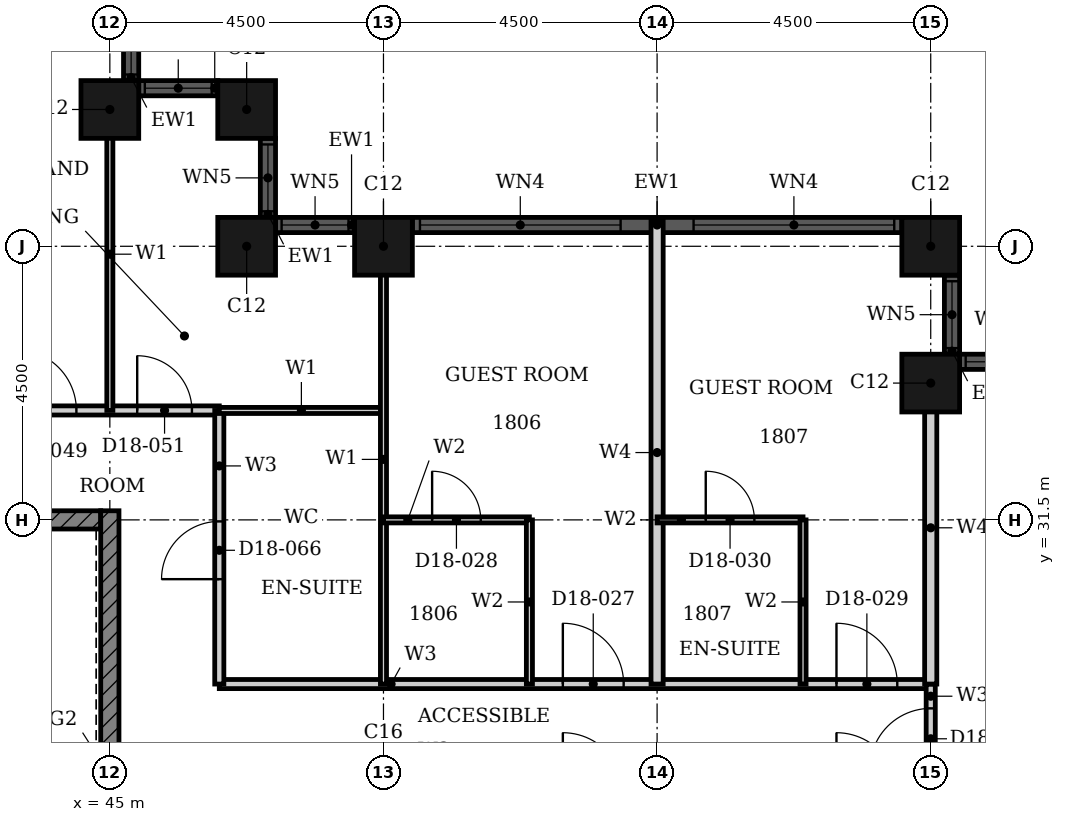
"""IFC4 building model, lengths in metres.
Left out: names, types, materials, properties, quantities, classifications, styles, units other than length and angle.
Written with IfcOpenShell. Run it as: python <this file> out.ifc"""

import sys

from ifc_helpers import new_model, si_unit, direction, frame, frame_2d, origin, origin_2d, place, context, subcontext, project, spatial, rectangle, hollow_rectangle, extrude, element, fill, save


model = new_model("IFC4")
c1 = context("Model", 3, precision=1e-05, world=origin(), true_north=direction((0.0, 1.0)))
c2 = subcontext(c1, "Body", "Model", "MODEL_VIEW")
j1 = project(units=[si_unit("LENGTHUNIT", "METRE"), si_unit("PLANEANGLEUNIT", "RADIAN")], contexts=[c1])
p1 = place(None, origin())
s1 = spatial("IfcSite", under=j1, at=p1, CompositionType="ELEMENT")
p2 = place(p1, origin())
s2 = spatial("IfcBuilding", under=s1, at=p2, CompositionType="ELEMENT")
p3 = place(p2, frame((0.0, 0.0, 78.0)))
s3 = spatial("IfcBuildingStorey", under=s2, at=p3, CompositionType="ELEMENT", Elevation=78.0)
for number, where, z_axis, x_axis in (
    (1, (58.5, 33.75, 0.0), (0.0, 0.0, 1.0), (1.0, 0.0, 0.0)),
    (2, (58.5, 36.0, 0.0), (0.0, 0.0, 1.0), (1.0, 0.0, 0.0)),
    (3, (49.5, 36.0, 0.0), (0.0, 0.0, 1.0), (1.0, 0.0, 0.0)),
    (4, (47.25, 36.0, 0.0), (0.0, 0.0, 1.0), (1.0, 0.0, 0.0)),
    (5, (47.25, 38.25, 0.0), (0.0, 0.0, 1.0), (1.0, 0.0, 0.0)),
    (6, (45.0, 38.25, 0.0), (0.0, 0.0, 1.0), (1.0, 0.0, 0.0)),
):
    element("IfcColumn", number, at=place(p3, frame(where, z_axis=z_axis, x_axis=x_axis)), inside=s3, PredefinedType="COLUMN", context=c2, shape_type="SweptSolid", body=[
        extrude(hollow_rectangle(XDim=0.95, YDim=0.95, WallThickness=0.03, at=origin_2d()), origin(), (0.0, 0.0, 1.0), 3.6),
    ])
p4 = place(p3, frame((60.275, 34.1, 0.0), z_axis=(0.0, 0.0, 1.0), x_axis=(-1.0, 0.0, 0.0)))
e7 = element("IfcWall", 7, at=p4, inside=s3, PredefinedType="SOLIDWALL", context=c2, shape_type="SweptSolid", body=[
    extrude(rectangle(XDim=1.3, YDim=0.25, at=frame_2d((0.65, 0.0))), origin(), (0.0, 0.0, 1.0), 3.6),
])
p5 = place(p4, frame((0.1, 0.0, 0.9)))
e8 = element("IfcOpeningElement", 8, at=p5, cuts=e7, PredefinedType="OPENING", context=c2, shape_type="SweptSolid", body=[
    extrude(rectangle(XDim=1.1, YDim=2.08, at=frame_2d((0.55, 1.04))), frame((0.0, 0.135, 0.0), z_axis=(0.0, -1.0, 0.0), x_axis=(1.0, 0.0, 0.0)), (0.0, 0.0, 1.0), 0.27),
])
p6 = place(p3, frame((58.85, 34.225, 0.0), z_axis=(0.0, 0.0, 1.0), x_axis=(0.0, 1.0, 0.0)))
e9 = element("IfcWall", 9, at=p6, inside=s3, PredefinedType="SOLIDWALL", context=c2, shape_type="SweptSolid", body=[
    extrude(rectangle(XDim=1.3, YDim=0.25, at=frame_2d((0.65, 0.0))), origin(), (0.0, 0.0, 1.0), 3.6),
])
p7 = place(p6, frame((0.1, 0.0, 0.9)))
e10 = element("IfcOpeningElement", 10, at=p7, cuts=e9, PredefinedType="OPENING", context=c2, shape_type="SweptSolid", body=[
    extrude(rectangle(XDim=1.1, YDim=2.08, at=frame_2d((0.55, 1.04))), frame((0.0, 0.135, 0.0), z_axis=(0.0, -1.0, 0.0), x_axis=(1.0, 0.0, 0.0)), (0.0, 0.0, 1.0), 0.27),
])
p8 = place(p3, frame((58.025, 36.35, 0.0), z_axis=(0.0, 0.0, 1.0), x_axis=(-1.0, 0.0, 0.0)))
e11 = element("IfcWall", 11, at=p8, inside=s3, PredefinedType="SOLIDWALL", context=c2, shape_type="SweptSolid", body=[
    extrude(rectangle(XDim=8.05, YDim=0.25, at=frame_2d((4.025, 0.0))), origin(), (0.0, 0.0, 1.0), 3.6),
])
p9 = place(p8, frame((0.125, 0.0, 0.9)))
e12 = element("IfcOpeningElement", 12, at=p9, cuts=e11, PredefinedType="OPENING", context=c2, shape_type="SweptSolid", body=[
    extrude(rectangle(XDim=3.3, YDim=2.08, at=frame_2d((1.65, 1.04))), frame((0.0, 0.135, 0.0), z_axis=(0.0, -1.0, 0.0), x_axis=(1.0, 0.0, 0.0)), (0.0, 0.0, 1.0), 0.27),
])
p10 = place(p8, frame((4.625, 0.0, 0.9)))
e13 = element("IfcOpeningElement", 13, at=p10, cuts=e11, PredefinedType="OPENING", context=c2, shape_type="SweptSolid", body=[
    extrude(rectangle(XDim=3.3, YDim=2.08, at=frame_2d((1.65, 1.04))), frame((0.0, 0.135, 0.0), z_axis=(0.0, -1.0, 0.0), x_axis=(1.0, 0.0, 0.0)), (0.0, 0.0, 1.0), 0.27),
])
p11 = place(p3, frame((49.025, 36.35, 0.0), z_axis=(0.0, 0.0, 1.0), x_axis=(-1.0, 0.0, 0.0)))
e14 = element("IfcWall", 14, at=p11, inside=s3, PredefinedType="SOLIDWALL", context=c2, shape_type="SweptSolid", body=[
    extrude(rectangle(XDim=1.3, YDim=0.25, at=frame_2d((0.65, 0.0))), origin(), (0.0, 0.0, 1.0), 3.6),
])
p12 = place(p11, frame((0.1, 0.0, 0.9)))
e15 = element("IfcOpeningElement", 15, at=p12, cuts=e14, PredefinedType="OPENING", context=c2, shape_type="SweptSolid", body=[
    extrude(rectangle(XDim=1.1, YDim=2.08, at=frame_2d((0.55, 1.04))), frame((0.0, 0.135, 0.0), z_axis=(0.0, -1.0, 0.0), x_axis=(1.0, 0.0, 0.0)), (0.0, 0.0, 1.0), 0.27),
])
p13 = place(p3, frame((47.6, 36.475, 0.0), z_axis=(0.0, 0.0, 1.0), x_axis=(0.0, 1.0, 0.0)))
e16 = element("IfcWall", 16, at=p13, inside=s3, PredefinedType="SOLIDWALL", context=c2, shape_type="SweptSolid", body=[
    extrude(rectangle(XDim=1.3, YDim=0.25, at=frame_2d((0.65, 0.0))), origin(), (0.0, 0.0, 1.0), 3.6),
])
p14 = place(p13, frame((0.1, 0.0, 0.9)))
e17 = element("IfcOpeningElement", 17, at=p14, cuts=e16, PredefinedType="OPENING", context=c2, shape_type="SweptSolid", body=[
    extrude(rectangle(XDim=1.1, YDim=2.08, at=frame_2d((0.55, 1.04))), frame((0.0, 0.135, 0.0), z_axis=(0.0, -1.0, 0.0), x_axis=(1.0, 0.0, 0.0)), (0.0, 0.0, 1.0), 0.27),
])
p15 = place(p3, frame((46.775, 38.6, 0.0), z_axis=(0.0, 0.0, 1.0), x_axis=(-1.0, 0.0, 0.0)))
e18 = element("IfcWall", 18, at=p15, inside=s3, PredefinedType="SOLIDWALL", context=c2, shape_type="SweptSolid", body=[
    extrude(rectangle(XDim=1.3, YDim=0.25, at=frame_2d((0.65, 0.0))), origin(), (0.0, 0.0, 1.0), 3.6),
])
p16 = place(p15, frame((0.1, 0.0, 0.9)))
e19 = element("IfcOpeningElement", 19, at=p16, cuts=e18, PredefinedType="OPENING", context=c2, shape_type="SweptSolid", body=[
    extrude(rectangle(XDim=1.1, YDim=2.08, at=frame_2d((0.55, 1.04))), frame((0.0, 0.135, 0.0), z_axis=(0.0, -1.0, 0.0), x_axis=(1.0, 0.0, 0.0)), (0.0, 0.0, 1.0), 0.27),
])
p17 = place(p3, frame((45.35, 38.725, 0.0), z_axis=(0.0, 0.0, 1.0), x_axis=(0.0, 1.0, 0.0)))
e20 = element("IfcWall", 20, at=p17, inside=s3, PredefinedType="SOLIDWALL", context=c2, shape_type="SweptSolid", body=[
    extrude(rectangle(XDim=1.3, YDim=0.25, at=frame_2d((0.65, 0.0))), origin(), (0.0, 0.0, 1.0), 3.6),
])
p18 = place(p17, frame((0.1, 0.0, 0.9)))
e21 = element("IfcOpeningElement", 21, at=p18, cuts=e20, PredefinedType="OPENING", context=c2, shape_type="SweptSolid", body=[
    extrude(rectangle(XDim=1.1, YDim=2.08, at=frame_2d((0.55, 1.04))), frame((0.0, 0.135, 0.0), z_axis=(0.0, -1.0, 0.0), x_axis=(1.0, 0.0, 0.0)), (0.0, 0.0, 1.0), 0.27),
])
p19 = place(p3, frame((40.625, 31.5, 0.0), z_axis=(0.0, 0.0, 1.0), x_axis=(1.0, 0.0, 0.0)))
e22 = element("IfcWall", 22, at=p19, inside=s3, PredefinedType="SHEAR", context=c2, shape_type="SweptSolid", body=[
    extrude(rectangle(XDim=4.225, YDim=0.3, at=frame_2d((2.113, 0.0))), origin(), (0.0, 0.0, 1.0), 3.3),
])
p20 = place(p3, frame((45.0, 22.35, 0.0), z_axis=(0.0, 0.0, 1.0), x_axis=(0.0, 1.0, 0.0)))
e23 = element("IfcWall", 23, at=p20, inside=s3, PredefinedType="SHEAR", context=c2, shape_type="SweptSolid", body=[
    extrude(rectangle(XDim=9.3, YDim=0.3, at=frame_2d((4.65, 0.0))), origin(), (0.0, 0.0, 1.0), 3.3),
])
p21 = place(p3, frame((46.8, 28.8, 0.0), z_axis=(0.0, 0.0, 1.0), x_axis=(1.0, 0.0, 0.0)))
e24 = element("IfcWall", 24, at=p21, inside=s3, PredefinedType="PARTITIONING", context=c2, shape_type="SweptSolid", body=[
    extrude(rectangle(XDim=11.7, YDim=0.15, at=frame_2d((5.85, 0.0))), origin(), (0.0, 0.0, 1.0), 3.3),
])
p22 = place(p21, frame((5.65, 0.0, 0.0)))
e25 = element("IfcOpeningElement", 25, at=p22, cuts=e24, PredefinedType="OPENING", context=c2, shape_type="SweptSolid", body=[
    extrude(rectangle(XDim=1.0, YDim=2.1, at=frame_2d((0.5, 1.05))), frame((0.0, 0.085, 0.0), z_axis=(0.0, -1.0, 0.0), x_axis=(1.0, 0.0, 0.0)), (0.0, 0.0, 1.0), 0.17),
])
p23 = place(p21, frame((10.15, 0.0, 0.0)))
e26 = element("IfcOpeningElement", 26, at=p23, cuts=e24, PredefinedType="OPENING", context=c2, shape_type="SweptSolid", body=[
    extrude(rectangle(XDim=1.0, YDim=2.1, at=frame_2d((0.5, 1.05))), frame((0.0, 0.085, 0.0), z_axis=(0.0, -1.0, 0.0), x_axis=(1.0, 0.0, 0.0)), (0.0, 0.0, 1.0), 0.17),
])
p24 = place(p3, frame((33.3, 33.3, 0.0), z_axis=(0.0, 0.0, 1.0), x_axis=(1.0, 0.0, 0.0)))
e27 = element("IfcWall", 27, at=p24, inside=s3, PredefinedType="PARTITIONING", context=c2, shape_type="SweptSolid", body=[
    extrude(rectangle(XDim=13.5, YDim=0.15, at=frame_2d((6.75, 0.0))), origin(), (0.0, 0.0, 1.0), 3.3),
])
p25 = place(p24, frame((10.15, 0.0, 0.0)))
e28 = element("IfcOpeningElement", 28, at=p25, cuts=e27, PredefinedType="OPENING", context=c2, shape_type="SweptSolid", body=[
    extrude(rectangle(XDim=1.0, YDim=2.1, at=frame_2d((0.5, 1.05))), frame((0.0, 0.085, 0.0), z_axis=(0.0, -1.0, 0.0), x_axis=(1.0, 0.0, 0.0)), (0.0, 0.0, 1.0), 0.17),
])
p26 = place(p24, frame((12.15, 0.0, 0.0)))
e29 = element("IfcOpeningElement", 29, at=p26, cuts=e27, PredefinedType="OPENING", context=c2, shape_type="SweptSolid", body=[
    extrude(rectangle(XDim=0.9, YDim=2.1, at=frame_2d((0.45, 1.05))), frame((0.0, 0.085, 0.0), z_axis=(0.0, -1.0, 0.0), x_axis=(1.0, 0.0, 0.0)), (0.0, 0.0, 1.0), 0.17),
])
p27 = place(p24, frame((3.15, 0.0, 0.0)))
e30 = element("IfcOpeningElement", 30, at=p27, cuts=e27, PredefinedType="OPENING", context=c2, shape_type="SweptSolid", body=[
    extrude(rectangle(XDim=0.9, YDim=2.1, at=frame_2d((0.45, 1.05))), frame((0.0, 0.085, 0.0), z_axis=(0.0, -1.0, 0.0), x_axis=(1.0, 0.0, 0.0)), (0.0, 0.0, 1.0), 0.17),
])
p28 = place(p3, frame((46.8, 28.8, 0.0), z_axis=(0.0, 0.0, 1.0), x_axis=(0.0, 1.0, 0.0)))
e31 = element("IfcWall", 31, at=p28, inside=s3, PredefinedType="PARTITIONING", context=c2, shape_type="SweptSolid", body=[
    extrude(rectangle(XDim=4.5, YDim=0.15, at=frame_2d((2.25, 0.0))), origin(), (0.0, 0.0, 1.0), 3.3),
])
p29 = place(p28, frame((1.725, 0.0, 0.0)))
e32 = element("IfcOpeningElement", 32, at=p29, cuts=e31, PredefinedType="OPENING", context=c2, shape_type="SweptSolid", body=[
    extrude(rectangle(XDim=0.95, YDim=2.1, at=frame_2d((0.475, 1.05))), frame((0.0, 0.085, 0.0), z_axis=(0.0, -1.0, 0.0), x_axis=(1.0, 0.0, 0.0)), (0.0, 0.0, 1.0), 0.17),
])
p30 = place(p3, frame((58.5, 27.0, 0.0), z_axis=(0.0, 0.0, 1.0), x_axis=(0.0, 1.0, 0.0)))
e33 = element("IfcWall", 33, at=p30, inside=s3, PredefinedType="PARTITIONING", context=c2, shape_type="SweptSolid", body=[
    extrude(rectangle(XDim=1.8, YDim=0.15, at=frame_2d((0.9, 0.0))), origin(), (0.0, 0.0, 1.0), 3.3),
])
p31 = place(p30, frame((0.4, 0.0, 0.0)))
e34 = element("IfcOpeningElement", 34, at=p31, cuts=e33, PredefinedType="OPENING", context=c2, shape_type="SweptSolid", body=[
    extrude(rectangle(XDim=1.0, YDim=2.1, at=frame_2d((0.5, 1.05))), frame((0.0, 0.085, 0.0), z_axis=(0.0, -1.0, 0.0), x_axis=(1.0, 0.0, 0.0)), (0.0, 0.0, 1.0), 0.17),
])
p32 = place(p3, frame((46.8, 33.3, 0.0), z_axis=(0.0, 0.0, 1.0), x_axis=(1.0, 0.0, 0.0)))
e35 = element("IfcWall", 35, at=p32, inside=s3, PredefinedType="PARTITIONING", context=c2, shape_type="SweptSolid", body=[
    extrude(rectangle(XDim=2.7, YDim=0.1, at=frame_2d((1.35, 0.0))), origin(), (0.0, 0.0, 1.0), 3.3),
])
p33 = place(p3, frame((45.0, 33.3, 0.0), z_axis=(0.0, 0.0, 1.0), x_axis=(0.0, 1.0, 0.0)))
e36 = element("IfcWall", 36, at=p33, inside=s3, PredefinedType="PARTITIONING", context=c2, shape_type="SweptSolid", body=[
    extrude(rectangle(XDim=5.14, YDim=0.1, at=frame_2d((2.57, 0.0))), origin(), (0.0, 0.0, 1.0), 3.3),
])
p34 = place(p3, frame((49.5, 28.8, 0.0), z_axis=(0.0, 0.0, 1.0), x_axis=(0.0, 1.0, 0.0)))
e37 = element("IfcWall", 37, at=p34, inside=s3, PredefinedType="PARTITIONING", context=c2, shape_type="SweptSolid", body=[
    extrude(rectangle(XDim=7.39, YDim=0.1, at=frame_2d((3.695, 0.0))), origin(), (0.0, 0.0, 1.0), 2.38),
])
p35 = place(p3, frame((54.0, 28.8, 0.0), z_axis=(0.0, 0.0, 1.0), x_axis=(0.0, 1.0, 0.0)))
e38 = element("IfcWall", 38, at=p35, inside=s3, PredefinedType="PARTITIONING", context=c2, shape_type="SweptSolid", body=[
    extrude(rectangle(XDim=7.615, YDim=0.2, at=frame_2d((3.808, 0.0))), origin(), (0.0, 0.0, 1.0), 3.3),
])
p36 = place(p3, frame((58.5, 28.8, 0.0), z_axis=(0.0, 0.0, 1.0), x_axis=(0.0, 1.0, 0.0)))
e39 = element("IfcWall", 39, at=p36, inside=s3, PredefinedType="PARTITIONING", context=c2, shape_type="SweptSolid", body=[
    extrude(rectangle(XDim=5.14, YDim=0.2, at=frame_2d((2.57, 0.0))), origin(), (0.0, 0.0, 1.0), 3.3),
])
p37 = place(p3, frame((49.5, 31.5, 0.0), z_axis=(0.0, 0.0, 1.0), x_axis=(1.0, 0.0, 0.0)))
e40 = element("IfcWall", 40, at=p37, inside=s3, PredefinedType="PARTITIONING", context=c2, shape_type="SweptSolid", body=[
    extrude(rectangle(XDim=2.4, YDim=0.1, at=frame_2d((1.2, 0.0))), origin(), (0.0, 0.0, 1.0), 2.58),
])
p38 = place(p37, frame((0.8, 0.0, 0.0)))
e41 = element("IfcOpeningElement", 41, at=p38, cuts=e40, PredefinedType="OPENING", context=c2, shape_type="SweptSolid", body=[
    extrude(rectangle(XDim=0.8, YDim=2.1, at=frame_2d((0.4, 1.05))), frame((0.0, 0.06, 0.0), z_axis=(0.0, -1.0, 0.0), x_axis=(1.0, 0.0, 0.0)), (0.0, 0.0, 1.0), 0.12),
])
p39 = place(p3, frame((54.0, 31.5, 0.0), z_axis=(0.0, 0.0, 1.0), x_axis=(1.0, 0.0, 0.0)))
e42 = element("IfcWall", 42, at=p39, inside=s3, PredefinedType="PARTITIONING", context=c2, shape_type="SweptSolid", body=[
    extrude(rectangle(XDim=2.4, YDim=0.1, at=frame_2d((1.2, 0.0))), origin(), (0.0, 0.0, 1.0), 2.58),
])
p40 = place(p39, frame((0.8, 0.0, 0.0)))
e43 = element("IfcOpeningElement", 43, at=p40, cuts=e42, PredefinedType="OPENING", context=c2, shape_type="SweptSolid", body=[
    extrude(rectangle(XDim=0.8, YDim=2.1, at=frame_2d((0.4, 1.05))), frame((0.0, 0.06, 0.0), z_axis=(0.0, -1.0, 0.0), x_axis=(1.0, 0.0, 0.0)), (0.0, 0.0, 1.0), 0.12),
])
for number, where, z_axis, x_axis in (
    (44, (51.9, 28.8, 0.0), (0.0, 0.0, 1.0), (0.0, 1.0, 0.0)),
    (45, (56.4, 28.8, 0.0), (0.0, 0.0, 1.0), (0.0, 1.0, 0.0)),
):
    element("IfcWall", number, at=place(p3, frame(where, z_axis=z_axis, x_axis=x_axis)), inside=s3, PredefinedType="PARTITIONING", context=c2, shape_type="SweptSolid", body=[
        extrude(rectangle(XDim=2.7, YDim=0.1, at=frame_2d((1.35, 0.0))), origin(), (0.0, 0.0, 1.0), 3.3),
    ])
p41 = place(p5, origin())
e46 = element("IfcWindow", 46, at=p41, inside=s3, PartitioningType="SINGLE_PANEL", PredefinedType="WINDOW", context=c2, shape_type="SweptSolid", body=[
    extrude(rectangle(XDim=1.1, YDim=2.08, at=frame_2d((0.55, 1.04))), frame((0.0, 0.03, 0.0), z_axis=(0.0, -1.0, 0.0), x_axis=(1.0, 0.0, 0.0)), (0.0, 0.0, 1.0), 0.06),
])
fill(e8, e46)
p42 = place(p7, origin())
e47 = element("IfcWindow", 47, at=p42, inside=s3, PartitioningType="SINGLE_PANEL", PredefinedType="WINDOW", context=c2, shape_type="SweptSolid", body=[
    extrude(rectangle(XDim=1.1, YDim=2.08, at=frame_2d((0.55, 1.04))), frame((0.0, 0.03, 0.0), z_axis=(0.0, -1.0, 0.0), x_axis=(1.0, 0.0, 0.0)), (0.0, 0.0, 1.0), 0.06),
])
fill(e10, e47)
p43 = place(p9, origin())
e48 = element("IfcWindow", 48, at=p43, inside=s3, PartitioningType="SINGLE_PANEL", PredefinedType="WINDOW", context=c2, shape_type="SweptSolid", body=[
    extrude(rectangle(XDim=3.3, YDim=2.08, at=frame_2d((1.65, 1.04))), frame((0.0, 0.03, 0.0), z_axis=(0.0, -1.0, 0.0), x_axis=(1.0, 0.0, 0.0)), (0.0, 0.0, 1.0), 0.06),
])
fill(e12, e48)
p44 = place(p10, origin())
e49 = element("IfcWindow", 49, at=p44, inside=s3, PartitioningType="SINGLE_PANEL", PredefinedType="WINDOW", context=c2, shape_type="SweptSolid", body=[
    extrude(rectangle(XDim=3.3, YDim=2.08, at=frame_2d((1.65, 1.04))), frame((0.0, 0.03, 0.0), z_axis=(0.0, -1.0, 0.0), x_axis=(1.0, 0.0, 0.0)), (0.0, 0.0, 1.0), 0.06),
])
fill(e13, e49)
p45 = place(p12, origin())
e50 = element("IfcWindow", 50, at=p45, inside=s3, PartitioningType="SINGLE_PANEL", PredefinedType="WINDOW", context=c2, shape_type="SweptSolid", body=[
    extrude(rectangle(XDim=1.1, YDim=2.08, at=frame_2d((0.55, 1.04))), frame((0.0, 0.03, 0.0), z_axis=(0.0, -1.0, 0.0), x_axis=(1.0, 0.0, 0.0)), (0.0, 0.0, 1.0), 0.06),
])
fill(e15, e50)
p46 = place(p14, origin())
e51 = element("IfcWindow", 51, at=p46, inside=s3, PartitioningType="SINGLE_PANEL", PredefinedType="WINDOW", context=c2, shape_type="SweptSolid", body=[
    extrude(rectangle(XDim=1.1, YDim=2.08, at=frame_2d((0.55, 1.04))), frame((0.0, 0.03, 0.0), z_axis=(0.0, -1.0, 0.0), x_axis=(1.0, 0.0, 0.0)), (0.0, 0.0, 1.0), 0.06),
])
fill(e17, e51)
p47 = place(p16, origin())
e52 = element("IfcWindow", 52, at=p47, inside=s3, PartitioningType="SINGLE_PANEL", PredefinedType="WINDOW", context=c2, shape_type="SweptSolid", body=[
    extrude(rectangle(XDim=1.1, YDim=2.08, at=frame_2d((0.55, 1.04))), frame((0.0, 0.03, 0.0), z_axis=(0.0, -1.0, 0.0), x_axis=(1.0, 0.0, 0.0)), (0.0, 0.0, 1.0), 0.06),
])
fill(e19, e52)
p48 = place(p18, origin())
e53 = element("IfcWindow", 53, at=p48, inside=s3, PartitioningType="SINGLE_PANEL", PredefinedType="WINDOW", context=c2, shape_type="SweptSolid", body=[
    extrude(rectangle(XDim=1.1, YDim=2.08, at=frame_2d((0.55, 1.04))), frame((0.0, 0.03, 0.0), z_axis=(0.0, -1.0, 0.0), x_axis=(1.0, 0.0, 0.0)), (0.0, 0.0, 1.0), 0.06),
])
fill(e21, e53)
p49 = place(p22, origin())
e54 = element("IfcDoor", 54, at=p49, inside=s3, OperationType="SINGLE_SWING_RIGHT", PredefinedType="DOOR", context=c2, shape_type="SweptSolid", body=[
    extrude(rectangle(XDim=1.0, YDim=2.1, at=frame_2d((0.5, 1.05))), frame((0.0, 0.025, 0.0), z_axis=(0.0, -1.0, 0.0), x_axis=(1.0, 0.0, 0.0)), (0.0, 0.0, 1.0), 0.05),
])
fill(e25, e54)
p50 = place(p38, origin())
e55 = element("IfcDoor", 55, at=p50, inside=s3, OperationType="SINGLE_SWING_RIGHT", PredefinedType="DOOR", context=c2, shape_type="SweptSolid", body=[
    extrude(rectangle(XDim=0.8, YDim=2.1, at=frame_2d((0.4, 1.05))), frame((0.0, 0.025, 0.0), z_axis=(0.0, -1.0, 0.0), x_axis=(1.0, 0.0, 0.0)), (0.0, 0.0, 1.0), 0.05),
])
fill(e41, e55)
p51 = place(p23, origin())
e56 = element("IfcDoor", 56, at=p51, inside=s3, OperationType="SINGLE_SWING_RIGHT", PredefinedType="DOOR", context=c2, shape_type="SweptSolid", body=[
    extrude(rectangle(XDim=1.0, YDim=2.1, at=frame_2d((0.5, 1.05))), frame((0.0, 0.025, 0.0), z_axis=(0.0, -1.0, 0.0), x_axis=(1.0, 0.0, 0.0)), (0.0, 0.0, 1.0), 0.05),
])
fill(e26, e56)
p52 = place(p40, origin())
e57 = element("IfcDoor", 57, at=p52, inside=s3, OperationType="SINGLE_SWING_RIGHT", PredefinedType="DOOR", context=c2, shape_type="SweptSolid", body=[
    extrude(rectangle(XDim=0.8, YDim=2.1, at=frame_2d((0.4, 1.05))), frame((0.0, 0.025, 0.0), z_axis=(0.0, -1.0, 0.0), x_axis=(1.0, 0.0, 0.0)), (0.0, 0.0, 1.0), 0.05),
])
fill(e43, e57)
p53 = place(p31, origin())
e58 = element("IfcDoor", 58, at=p53, inside=s3, OperationType="SINGLE_SWING_LEFT", PredefinedType="DOOR", context=c2, shape_type="SweptSolid", body=[
    extrude(rectangle(XDim=1.0, YDim=2.1, at=frame_2d((0.5, 1.05))), frame((0.0, 0.025, 0.0), z_axis=(0.0, -1.0, 0.0), x_axis=(1.0, 0.0, 0.0)), (0.0, 0.0, 1.0), 0.05),
])
fill(e34, e58)
p54 = place(p25, origin())
e59 = element("IfcDoor", 59, at=p54, inside=s3, OperationType="SINGLE_SWING_RIGHT", PredefinedType="DOOR", context=c2, shape_type="SweptSolid", body=[
    extrude(rectangle(XDim=1.0, YDim=2.1, at=frame_2d((0.5, 1.05))), frame((0.0, 0.025, 0.0), z_axis=(0.0, -1.0, 0.0), x_axis=(1.0, 0.0, 0.0)), (0.0, 0.0, 1.0), 0.05),
])
fill(e28, e59)
p55 = place(p26, origin())
e60 = element("IfcDoor", 60, at=p55, inside=s3, OperationType="SINGLE_SWING_LEFT", PredefinedType="DOOR", context=c2, shape_type="SweptSolid", body=[
    extrude(rectangle(XDim=0.9, YDim=2.1, at=frame_2d((0.45, 1.05))), frame((0.0, 0.025, 0.0), z_axis=(0.0, -1.0, 0.0), x_axis=(1.0, 0.0, 0.0)), (0.0, 0.0, 1.0), 0.05),
])
fill(e29, e60)
p56 = place(p29, origin())
e61 = element("IfcDoor", 61, at=p56, inside=s3, OperationType="SINGLE_SWING_LEFT", PredefinedType="DOOR", context=c2, shape_type="SweptSolid", body=[
    extrude(rectangle(XDim=0.95, YDim=2.1, at=frame_2d((0.475, 1.05))), frame((0.0, 0.025, 0.0), z_axis=(0.0, -1.0, 0.0), x_axis=(1.0, 0.0, 0.0)), (0.0, 0.0, 1.0), 0.05),
])
fill(e32, e61)
save(model, sys.argv[1])
